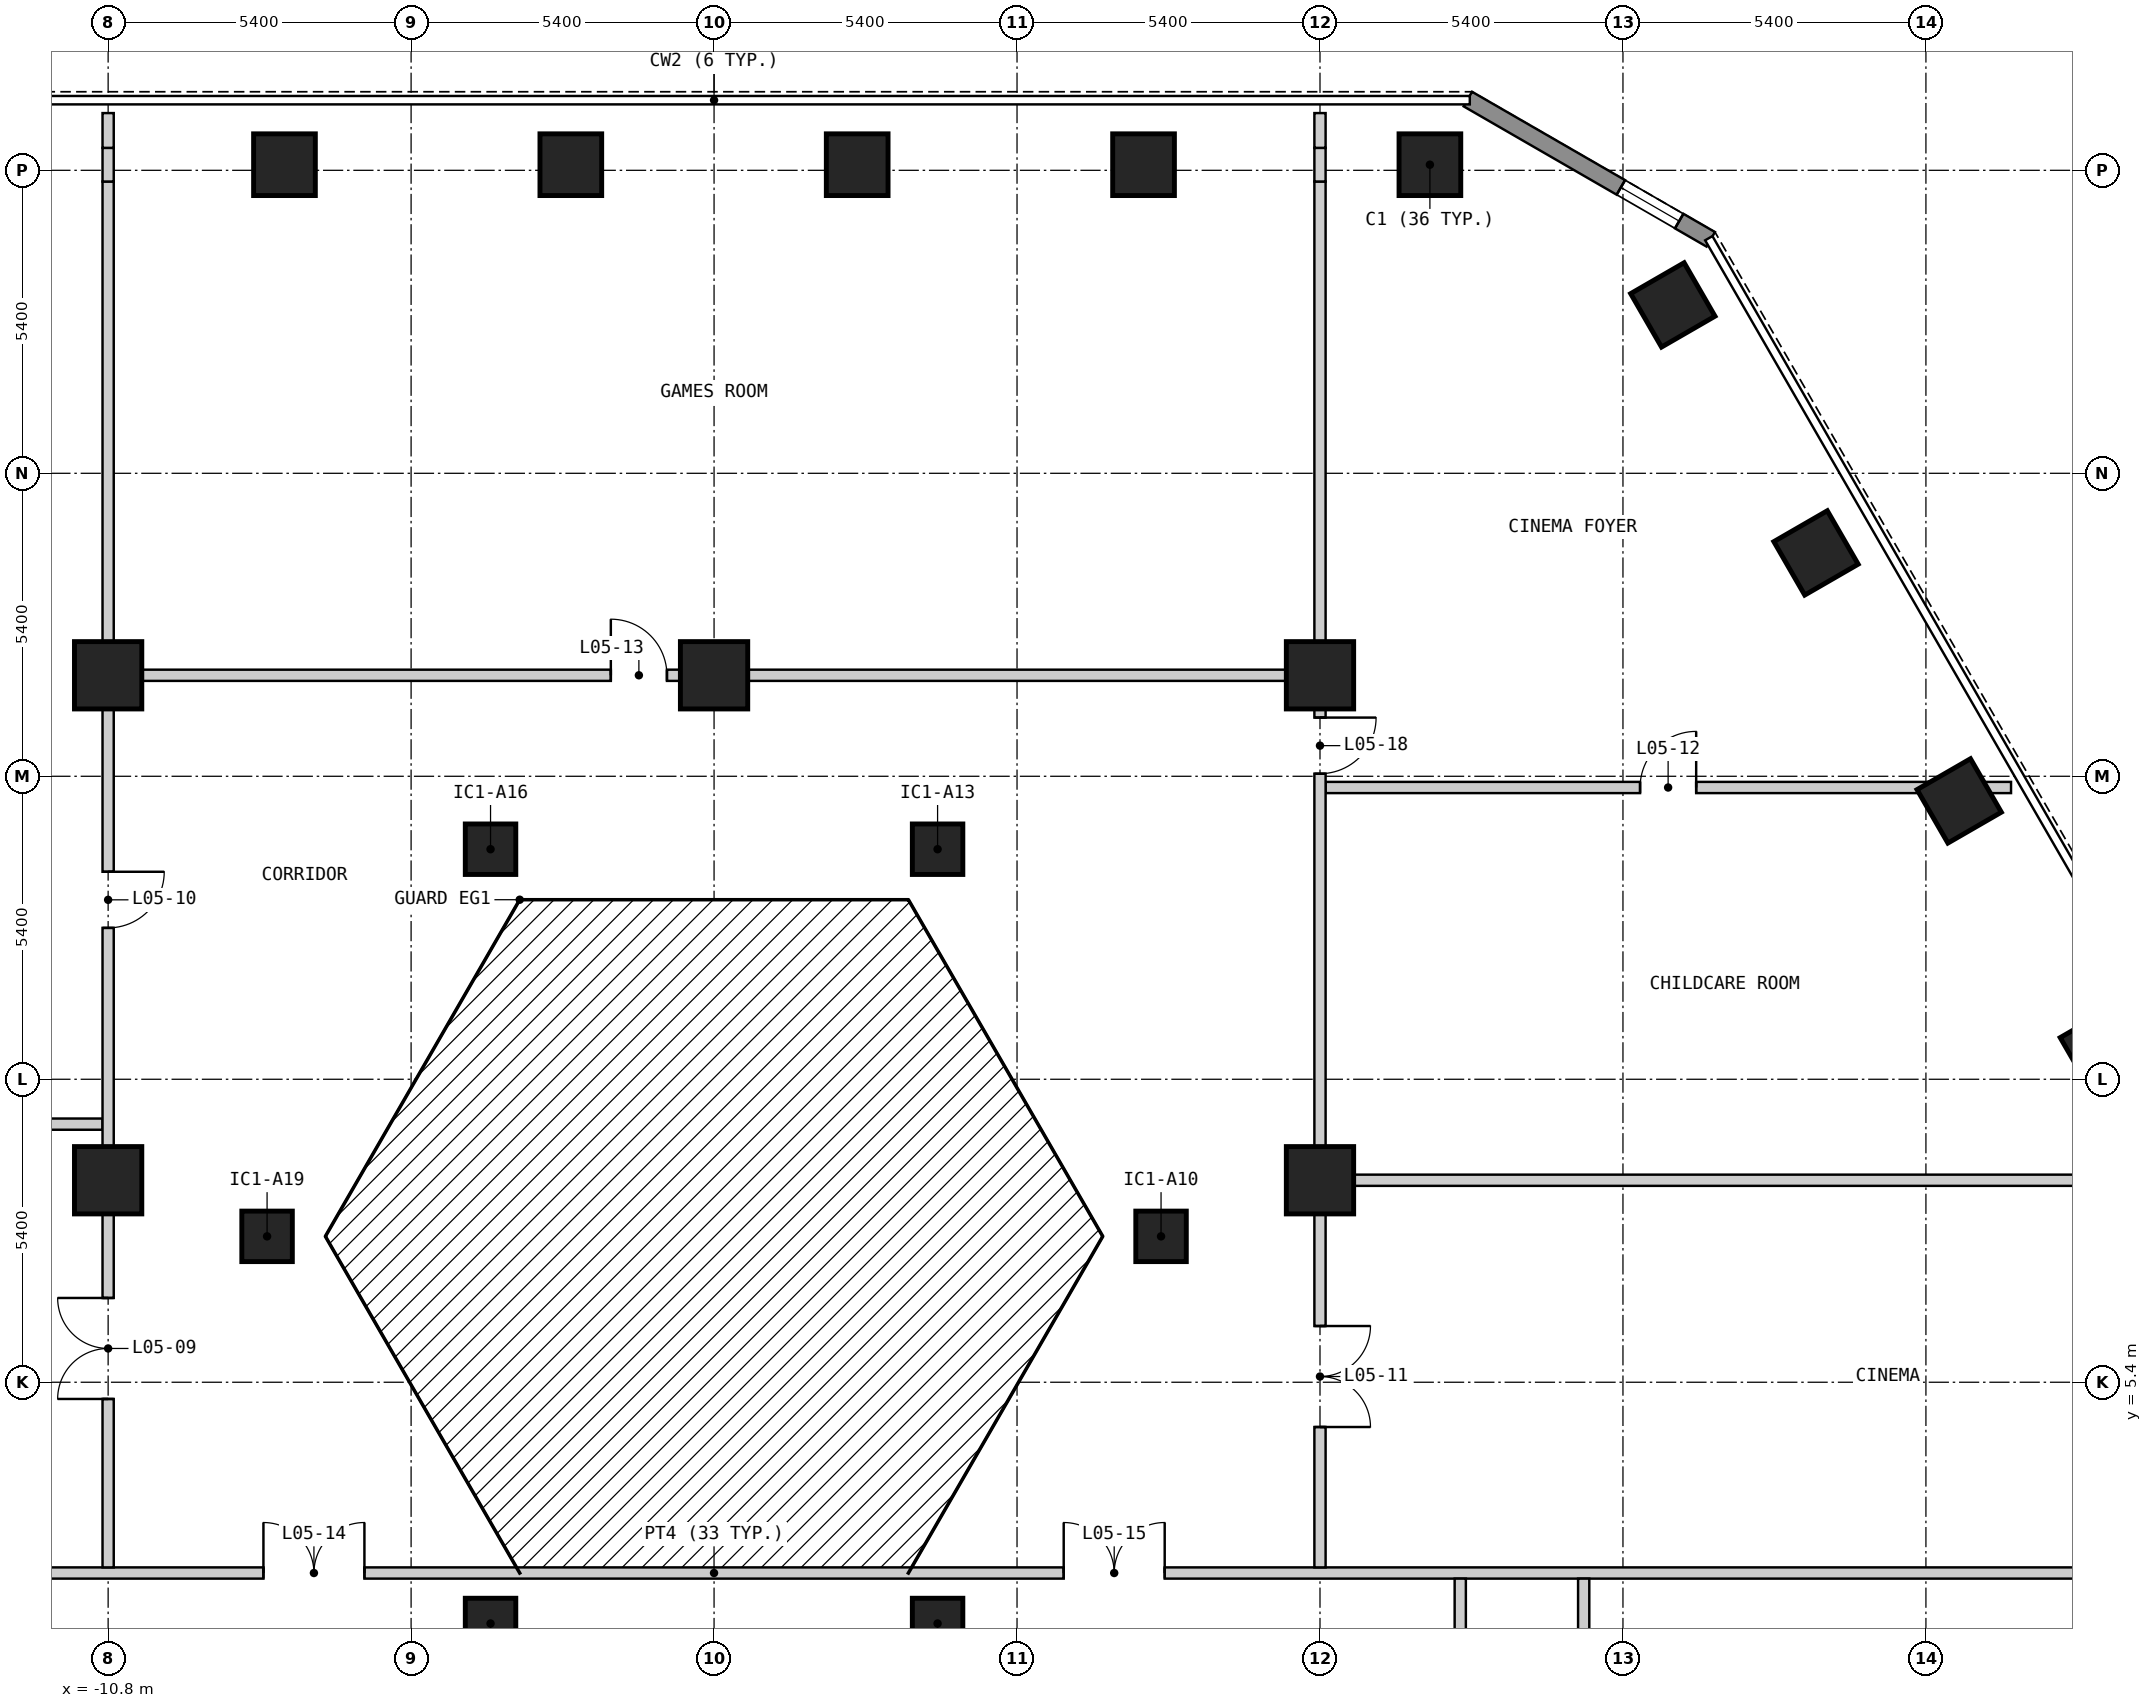
"""IFC4 building model, lengths in metres.
Left out: names, types, materials, properties, quantities, classifications, styles, units other than length and angle.
Written with IfcOpenShell. Run it as: python <this file> out.ifc"""

import sys

from ifc_helpers import new_model, si_unit, direction, frame, frame_2d, origin, origin_2d, place, context, subcontext, project, spatial, polyline, rectangle, outline, extrude, element, fill, save


model = new_model("IFC4")
c1 = context("Model", 3, precision=1e-05, world=origin(), true_north=direction((0.0, 1.0)))
c2 = subcontext(c1, "Body", "Model", "MODEL_VIEW")
j1 = project(units=[si_unit("LENGTHUNIT", "METRE"), si_unit("PLANEANGLEUNIT", "RADIAN")], contexts=[c1])
p1 = place(None, origin())
s1 = spatial("IfcSite", under=j1, at=p1, CompositionType="ELEMENT")
p2 = place(p1, origin())
s2 = spatial("IfcBuilding", under=s1, at=p2, CompositionType="ELEMENT")
p3 = place(p2, frame((0.0, 0.0, 19.8)))
s3 = spatial("IfcBuildingStorey", under=s2, at=p3, CompositionType="ELEMENT", Elevation=19.8)
for number, where, z_axis, x_axis in (
    (1, (12.759, 27.1, 0.0), (0.0, 0.0, 1.0), (-1.0, 0.0, 0.0)),
    (2, (7.655, 27.1, 0.0), (0.0, 0.0, 1.0), (-1.0, 0.0, 0.0)),
    (3, (2.551, 27.1, 0.0), (0.0, 0.0, 1.0), (-1.0, 0.0, 0.0)),
    (4, (-2.553, 27.1, 0.0), (0.0, 0.0, 1.0), (-1.0, 0.0, 0.0)),
    (5, (-7.657, 27.1, 0.0), (0.0, 0.0, 1.0), (-1.0, 0.0, 0.0)),
    (6, (24.745, 11.341, 0.0), (0.0, 0.0, 1.0), (-0.5, 0.866, 0.0)),
    (7, (22.193, 15.761, 0.0), (0.0, 0.0, 1.0), (-0.5, 0.866, 0.0)),
    (8, (19.641, 20.181, 0.0), (0.0, 0.0, 1.0), (-0.5, 0.866, 0.0)),
    (9, (17.089, 24.601, 0.0), (0.0, 0.0, 1.0), (-0.5, 0.866, 0.0)),
):
    element("IfcColumn", number, at=place(p3, frame(where, z_axis=z_axis, x_axis=x_axis)), inside=s3, PredefinedType="COLUMN", context=c2, shape_type="SweptSolid", body=[
        extrude(rectangle(XDim=1.1, YDim=1.1, at=origin_2d()), origin(), (0.0, 0.0, 1.0), 3.6),
    ])
for number, where, z_axis, x_axis in (
    (10, (3.984, 1.1, 0.0), (0.0, 0.0, 1.0), (1.0, 0.0, 0.0)),
    (11, (7.967, 8.0, 0.0), (0.0, 0.0, 1.0), (1.0, 0.0, 0.0)),
    (12, (3.984, 14.9, 0.0), (0.0, 0.0, 1.0), (1.0, 0.0, 0.0)),
    (13, (-3.984, 14.9, 0.0), (0.0, 0.0, 1.0), (1.0, 0.0, 0.0)),
    (14, (-7.967, 8.0, 0.0), (0.0, 0.0, 1.0), (1.0, 0.0, 0.0)),
    (15, (-3.984, 1.1, 0.0), (0.0, 0.0, 1.0), (1.0, 0.0, 0.0)),
):
    element("IfcColumn", number, at=place(p3, frame(where, z_axis=z_axis, x_axis=x_axis)), inside=s3, PredefinedType="COLUMN", context=c2, shape_type="SweptSolid", body=[
        extrude(rectangle(XDim=0.9, YDim=0.9, at=origin_2d()), origin(), (0.0, 0.0, 1.0), 3.6),
    ])
for number, where, z_axis, x_axis in (
    (16, (-10.8, 9.0, 0.0), (0.0, 0.0, 1.0), (1.0, 0.0, 0.0)),
    (17, (-10.8, 18.0, 0.0), (0.0, 0.0, 1.0), (1.0, 0.0, 0.0)),
    (18, (0.0, 18.0, 0.0), (0.0, 0.0, 1.0), (1.0, 0.0, 0.0)),
    (19, (10.8, 9.0, 0.0), (0.0, 0.0, 1.0), (1.0, 0.0, 0.0)),
    (20, (10.8, 18.0, 0.0), (0.0, 0.0, 1.0), (1.0, 0.0, 0.0)),
):
    element("IfcColumn", number, at=place(p3, frame(where, z_axis=z_axis, x_axis=x_axis)), inside=s3, PredefinedType="COLUMN", context=c2, shape_type="SweptSolid", body=[
        extrude(rectangle(XDim=1.2, YDim=1.2, at=origin_2d()), origin(), (0.0, 0.0, 1.0), 3.6),
    ])
p4 = place(p3, frame((17.765, 25.77, 0.0), z_axis=(0.0, 0.0, 1.0), x_axis=(-0.866010750942, 0.50002537861, 0.0)))
e21 = element("IfcWall", 21, at=p4, inside=s3, PredefinedType="SOLIDWALL", context=c2, shape_type="SweptSolid", body=[
    extrude(outline(polyline([(0.0, -0.15), (5.0, -0.15), (4.919, 0.15), (0.08, 0.15), (0.0, -0.15)])), origin(), (0.0, 0.0, 1.0), 2.8),
])
p5 = place(p4, frame((0.65, 0.0, 0.15)))
e22 = element("IfcOpeningElement", 22, at=p5, cuts=e21, PredefinedType="OPENING", context=c2, shape_type="SweptSolid", body=[
    extrude(rectangle(XDim=1.2, YDim=2.1, at=frame_2d((0.6, 1.05))), frame((0.0, 0.16, 0.0), z_axis=(0.0, -1.0, 0.0), x_axis=(1.0, 0.0, 0.0)), (0.0, 0.0, 1.0), 0.32),
])
p6 = place(p3, frame((-29.549, 2.0, 0.0), z_axis=(0.0, 0.0, 1.0), x_axis=(1.0, 0.0, 0.0)))
e23 = element("IfcWall", 23, at=p6, inside=s3, PredefinedType="PARTITIONING", context=c2, shape_type="SweptSolid", body=[
    extrude(rectangle(XDim=59.097, YDim=0.2, at=frame_2d((29.549, 0.0))), origin(), (0.0, 0.0, 1.0), 2.8),
])
p7 = place(p6, frame((21.517, 0.0, 0.0)))
e24 = element("IfcOpeningElement", 24, at=p7, cuts=e23, PredefinedType="OPENING", context=c2, shape_type="SweptSolid", body=[
    extrude(rectangle(XDim=1.8, YDim=2.1, at=frame_2d((0.9, 1.05))), frame((0.0, 0.11, 0.0), z_axis=(0.0, -1.0, 0.0), x_axis=(1.0, 0.0, 0.0)), (0.0, 0.0, 1.0), 0.22),
])
p8 = place(p6, frame((35.781, 0.0, 0.0)))
e25 = element("IfcOpeningElement", 25, at=p8, cuts=e23, PredefinedType="OPENING", context=c2, shape_type="SweptSolid", body=[
    extrude(rectangle(XDim=1.8, YDim=2.1, at=frame_2d((0.9, 1.05))), frame((0.0, 0.11, 0.0), z_axis=(0.0, -1.0, 0.0), x_axis=(1.0, 0.0, 0.0)), (0.0, 0.0, 1.0), 0.22),
])
p9 = place(p3, frame((10.9, 9.0, 0.0), z_axis=(0.0, 0.0, 1.0), x_axis=(1.0, 0.0, 0.0)))
e26 = element("IfcWall", 26, at=p9, inside=s3, PredefinedType="PARTITIONING", context=c2, shape_type="SweptSolid", body=[
    extrude(rectangle(XDim=14.792, YDim=0.2, at=frame_2d((7.396, 0.0))), origin(), (0.0, 0.0, 1.0), 2.8),
])
p10 = place(p3, frame((-25.115, 10.0, 0.0), z_axis=(0.0, 0.0, 1.0), x_axis=(1.0, 0.0, 0.0)))
e27 = element("IfcWall", 27, at=p10, inside=s3, PredefinedType="PARTITIONING", context=c2, shape_type="SweptSolid", body=[
    extrude(rectangle(XDim=14.215, YDim=0.2, at=frame_2d((7.107, 0.0))), origin(), (0.0, 0.0, 1.0), 2.8),
])
p11 = place(p3, frame((10.9, 16.0, 0.0), z_axis=(0.0, 0.0, 1.0), x_axis=(1.0, 0.0, 0.0)))
e28 = element("IfcWall", 28, at=p11, inside=s3, PredefinedType="PARTITIONING", context=c2, shape_type="SweptSolid", body=[
    extrude(rectangle(XDim=10.751, YDim=0.2, at=frame_2d((5.375, 0.0))), origin(), (0.0, 0.0, 1.0), 2.8),
])
p12 = place(p11, frame((6.605, 0.0, 0.0), z_axis=(0.0, 0.0, 1.0), x_axis=(-1.0, 0.0, 0.0)))
e29 = element("IfcOpeningElement", 29, at=p12, cuts=e28, PredefinedType="OPENING", context=c2, shape_type="SweptSolid", body=[
    extrude(rectangle(XDim=1.0, YDim=2.1, at=frame_2d((0.5, 1.05))), frame((0.0, 0.11, 0.0), z_axis=(0.0, -1.0, 0.0), x_axis=(1.0, 0.0, 0.0)), (0.0, 0.0, 1.0), 0.22),
])
p13 = place(p3, frame((21.651, 16.0, 0.0), z_axis=(0.0, 0.0, 1.0), x_axis=(1.0, 0.0, 0.0)))
e30 = element("IfcWall", 30, at=p13, inside=s3, PredefinedType="PARTITIONING", context=c2, shape_type="SweptSolid", body=[
    extrude(rectangle(XDim=0.802, YDim=0.2, at=frame_2d((0.401, 0.0))), origin(), (0.0, 0.0, 1.0), 2.07),
])
p14 = place(p3, frame((22.453, 16.0, 0.0), z_axis=(0.0, 0.0, 1.0), x_axis=(1.0, 0.0, 0.0)))
e31 = element("IfcWall", 31, at=p14, inside=s3, PredefinedType="PARTITIONING", context=c2, shape_type="SweptSolid", body=[
    extrude(rectangle(XDim=0.664, YDim=0.2, at=frame_2d((0.332, 0.0))), origin(), (0.0, 0.0, 1.0), 2.8),
])
p15 = place(p3, frame((-10.7, 18.0, 0.0), z_axis=(0.0, 0.0, 1.0), x_axis=(1.0, 0.0, 0.0)))
e32 = element("IfcWall", 32, at=p15, inside=s3, PredefinedType="PARTITIONING", context=c2, shape_type="SweptSolid", body=[
    extrude(rectangle(XDim=21.4, YDim=0.2, at=frame_2d((10.7, 0.0))), origin(), (0.0, 0.0, 1.0), 2.8),
])
p16 = place(p15, frame((8.86, 0.0, 0.0)))
e33 = element("IfcOpeningElement", 33, at=p16, cuts=e32, PredefinedType="OPENING", context=c2, shape_type="SweptSolid", body=[
    extrude(rectangle(XDim=1.0, YDim=2.1, at=frame_2d((0.5, 1.05))), frame((0.0, 0.11, 0.0), z_axis=(0.0, -1.0, 0.0), x_axis=(1.0, 0.0, 0.0)), (0.0, 0.0, 1.0), 0.22),
])
p17 = place(p3, frame((-10.8, 2.1, 0.0), z_axis=(0.0, 0.0, 1.0), x_axis=(0.0, 1.0, 0.0)))
e34 = element("IfcWall", 34, at=p17, inside=s3, PredefinedType="PARTITIONING", context=c2, shape_type="SweptSolid", body=[
    extrude(rectangle(XDim=24.7, YDim=0.2, at=frame_2d((12.35, 0.0))), origin(), (0.0, 0.0, 1.0), 2.8),
])
p18 = place(p17, frame((3.002, 0.0, 0.0)))
e35 = element("IfcOpeningElement", 35, at=p18, cuts=e34, PredefinedType="OPENING", context=c2, shape_type="SweptSolid", body=[
    extrude(rectangle(XDim=1.8, YDim=2.1, at=frame_2d((0.9, 1.05))), frame((0.0, 0.11, 0.0), z_axis=(0.0, -1.0, 0.0), x_axis=(1.0, 0.0, 0.0)), (0.0, 0.0, 1.0), 0.22),
])
p19 = place(p17, frame((11.398, 0.0, 0.0)))
e36 = element("IfcOpeningElement", 36, at=p19, cuts=e34, PredefinedType="OPENING", context=c2, shape_type="SweptSolid", body=[
    extrude(rectangle(XDim=1.0, YDim=2.1, at=frame_2d((0.5, 1.05))), frame((0.0, 0.11, 0.0), z_axis=(0.0, -1.0, 0.0), x_axis=(1.0, 0.0, 0.0)), (0.0, 0.0, 1.0), 0.22),
])
p20 = place(p3, frame((-10.8, 26.8, 0.0), z_axis=(0.0, 0.0, 1.0), x_axis=(0.0, 1.0, 0.0)))
e37 = element("IfcWall", 37, at=p20, inside=s3, PredefinedType="PARTITIONING", context=c2, shape_type="SweptSolid", body=[
    extrude(rectangle(XDim=0.6, YDim=0.2, at=frame_2d((0.3, 0.0))), origin(), (0.0, 0.0, 1.0), 2.07),
])
p21 = place(p3, frame((-10.8, 27.4, 0.0), z_axis=(0.0, 0.0, 1.0), x_axis=(0.0, 1.0, 0.0)))
e38 = element("IfcWall", 38, at=p21, inside=s3, PredefinedType="PARTITIONING", context=c2, shape_type="SweptSolid", body=[
    extrude(rectangle(XDim=0.62, YDim=0.2, at=frame_2d((0.31, 0.0))), origin(), (0.0, 0.0, 1.0), 2.8),
])
p22 = place(p3, frame((10.8, 2.1, 0.0), z_axis=(0.0, 0.0, 1.0), x_axis=(0.0, 1.0, 0.0)))
e39 = element("IfcWall", 39, at=p22, inside=s3, PredefinedType="PARTITIONING", context=c2, shape_type="SweptSolid", body=[
    extrude(rectangle(XDim=24.7, YDim=0.2, at=frame_2d((12.35, 0.0))), origin(), (0.0, 0.0, 1.0), 2.8),
])
p23 = place(p22, frame((4.302, 0.0, 0.0), z_axis=(0.0, 0.0, 1.0), x_axis=(-1.0, 0.0, 0.0)))
e40 = element("IfcOpeningElement", 40, at=p23, cuts=e39, PredefinedType="OPENING", context=c2, shape_type="SweptSolid", body=[
    extrude(rectangle(XDim=1.8, YDim=2.1, at=frame_2d((0.9, 1.05))), frame((0.0, 0.11, 0.0), z_axis=(0.0, -1.0, 0.0), x_axis=(1.0, 0.0, 0.0)), (0.0, 0.0, 1.0), 0.22),
])
p24 = place(p22, frame((14.146, 0.0, 0.0)))
e41 = element("IfcOpeningElement", 41, at=p24, cuts=e39, PredefinedType="OPENING", context=c2, shape_type="SweptSolid", body=[
    extrude(rectangle(XDim=1.0, YDim=2.1, at=frame_2d((0.5, 1.05))), frame((0.0, 0.11, 0.0), z_axis=(0.0, -1.0, 0.0), x_axis=(1.0, 0.0, 0.0)), (0.0, 0.0, 1.0), 0.22),
])
p25 = place(p3, frame((10.8, 26.8, 0.0), z_axis=(0.0, 0.0, 1.0), x_axis=(0.0, 1.0, 0.0)))
e42 = element("IfcWall", 42, at=p25, inside=s3, PredefinedType="PARTITIONING", context=c2, shape_type="SweptSolid", body=[
    extrude(rectangle(XDim=0.6, YDim=0.2, at=frame_2d((0.3, 0.0))), origin(), (0.0, 0.0, 1.0), 2.07),
])
p26 = place(p3, frame((10.8, 27.4, 0.0), z_axis=(0.0, 0.0, 1.0), x_axis=(0.0, 1.0, 0.0)))
e43 = element("IfcWall", 43, at=p26, inside=s3, PredefinedType="PARTITIONING", context=c2, shape_type="SweptSolid", body=[
    extrude(rectangle(XDim=0.62, YDim=0.2, at=frame_2d((0.31, 0.0))), origin(), (0.0, 0.0, 1.0), 2.8),
])
p27 = place(p3, frame((13.3, -4.88, 0.0), z_axis=(0.0, 0.0, 1.0), x_axis=(0.0, 1.0, 0.0)))
e44 = element("IfcWall", 44, at=p27, inside=s3, PredefinedType="PARTITIONING", context=c2, shape_type="SweptSolid", body=[
    extrude(rectangle(XDim=6.78, YDim=0.2, at=frame_2d((3.39, 0.0))), origin(), (0.0, 0.0, 1.0), 2.8),
])
p28 = place(p3, frame((15.5, -25.114, 0.0), z_axis=(0.0, 0.0, 1.0), x_axis=(0.0, 1.0, 0.0)))
e45 = element("IfcWall", 45, at=p28, inside=s3, PredefinedType="PARTITIONING", context=c2, shape_type="SweptSolid", body=[
    extrude(rectangle(XDim=27.014, YDim=0.2, at=frame_2d((13.507, 0.0))), origin(), (0.0, 0.0, 1.0), 2.8),
])
p29 = place(p28, frame((10.516, 0.0, 0.0), z_axis=(0.0, 0.0, 1.0), x_axis=(-1.0, 0.0, 0.0)))
e46 = element("IfcOpeningElement", 46, at=p29, cuts=e45, PredefinedType="OPENING", context=c2, shape_type="SweptSolid", body=[
    extrude(rectangle(XDim=1.0, YDim=2.1, at=frame_2d((0.5, 1.05))), frame((0.0, 0.11, 0.0), z_axis=(0.0, -1.0, 0.0), x_axis=(1.0, 0.0, 0.0)), (0.0, 0.0, 1.0), 0.22),
])
p30 = place(p28, frame((22.112, 0.0, 0.0), z_axis=(0.0, 0.0, 1.0), x_axis=(-1.0, 0.0, 0.0)))
e47 = element("IfcOpeningElement", 47, at=p30, cuts=e45, PredefinedType="OPENING", context=c2, shape_type="SweptSolid", body=[
    extrude(rectangle(XDim=1.0, YDim=2.1, at=frame_2d((0.5, 1.05))), frame((0.0, 0.11, 0.0), z_axis=(0.0, -1.0, 0.0), x_axis=(1.0, 0.0, 0.0)), (0.0, 0.0, 1.0), 0.22),
])
p31 = place(p5, origin())
e48 = element("IfcWindow", 48, at=p31, inside=s3, PartitioningType="SINGLE_PANEL", PredefinedType="WINDOW", context=c2, shape_type="SweptSolid", body=[
    extrude(rectangle(XDim=1.2, YDim=2.1, at=frame_2d((0.6, 1.05))), frame((0.0, 0.03, 0.0), z_axis=(0.0, -1.0, 0.0), x_axis=(1.0, 0.0, 0.0)), (0.0, 0.0, 1.0), 0.06),
])
fill(e22, e48)
p32 = place(p18, origin())
e49 = element("IfcDoor", 49, at=p32, inside=s3, OperationType="DOUBLE_DOOR_SINGLE_SWING", PredefinedType="DOOR", context=c2, shape_type="SweptSolid", body=[
    extrude(rectangle(XDim=1.8, YDim=2.1, at=frame_2d((0.9, 1.05))), frame((0.0, 0.025, 0.0), z_axis=(0.0, -1.0, 0.0), x_axis=(1.0, 0.0, 0.0)), (0.0, 0.0, 1.0), 0.05),
])
fill(e35, e49)
p33 = place(p19, origin())
e50 = element("IfcDoor", 50, at=p33, inside=s3, OperationType="SINGLE_SWING_RIGHT", PredefinedType="DOOR", context=c2, shape_type="SweptSolid", body=[
    extrude(rectangle(XDim=1.0, YDim=2.1, at=frame_2d((0.5, 1.05))), frame((0.0, 0.025, 0.0), z_axis=(0.0, -1.0, 0.0), x_axis=(1.0, 0.0, 0.0)), (0.0, 0.0, 1.0), 0.05),
])
fill(e36, e50)
p34 = place(p23, origin())
e51 = element("IfcDoor", 51, at=p34, inside=s3, OperationType="DOUBLE_DOOR_SINGLE_SWING", PredefinedType="DOOR", context=c2, shape_type="SweptSolid", body=[
    extrude(rectangle(XDim=1.8, YDim=2.1, at=frame_2d((0.9, 1.05))), frame((0.0, 0.025, 0.0), z_axis=(0.0, -1.0, 0.0), x_axis=(1.0, 0.0, 0.0)), (0.0, 0.0, 1.0), 0.05),
])
fill(e40, e51)
p35 = place(p12, origin())
e52 = element("IfcDoor", 52, at=p35, inside=s3, OperationType="SINGLE_SWING_LEFT", PredefinedType="DOOR", context=c2, shape_type="SweptSolid", body=[
    extrude(rectangle(XDim=1.0, YDim=2.1, at=frame_2d((0.5, 1.05))), frame((0.0, 0.025, 0.0), z_axis=(0.0, -1.0, 0.0), x_axis=(1.0, 0.0, 0.0)), (0.0, 0.0, 1.0), 0.05),
])
fill(e29, e52)
p36 = place(p16, origin())
e53 = element("IfcDoor", 53, at=p36, inside=s3, OperationType="SINGLE_SWING_LEFT", PredefinedType="DOOR", context=c2, shape_type="SweptSolid", body=[
    extrude(rectangle(XDim=1.0, YDim=2.1, at=frame_2d((0.5, 1.05))), frame((0.0, 0.025, 0.0), z_axis=(0.0, -1.0, 0.0), x_axis=(1.0, 0.0, 0.0)), (0.0, 0.0, 1.0), 0.05),
])
fill(e33, e53)
p37 = place(p7, origin())
e54 = element("IfcDoor", 54, at=p37, inside=s3, OperationType="DOUBLE_DOOR_SINGLE_SWING", PredefinedType="DOOR", context=c2, shape_type="SweptSolid", body=[
    extrude(rectangle(XDim=1.8, YDim=2.1, at=frame_2d((0.9, 1.05))), frame((0.0, 0.025, 0.0), z_axis=(0.0, -1.0, 0.0), x_axis=(1.0, 0.0, 0.0)), (0.0, 0.0, 1.0), 0.05),
])
fill(e24, e54)
p38 = place(p8, origin())
e55 = element("IfcDoor", 55, at=p38, inside=s3, OperationType="DOUBLE_DOOR_SINGLE_SWING", PredefinedType="DOOR", context=c2, shape_type="SweptSolid", body=[
    extrude(rectangle(XDim=1.8, YDim=2.1, at=frame_2d((0.9, 1.05))), frame((0.0, 0.025, 0.0), z_axis=(0.0, -1.0, 0.0), x_axis=(1.0, 0.0, 0.0)), (0.0, 0.0, 1.0), 0.05),
])
fill(e25, e55)
p39 = place(p24, origin())
e56 = element("IfcDoor", 56, at=p39, inside=s3, OperationType="SINGLE_SWING_RIGHT", PredefinedType="DOOR", context=c2, shape_type="SweptSolid", body=[
    extrude(rectangle(XDim=1.0, YDim=2.1, at=frame_2d((0.5, 1.05))), frame((0.0, 0.025, 0.0), z_axis=(0.0, -1.0, 0.0), x_axis=(1.0, 0.0, 0.0)), (0.0, 0.0, 1.0), 0.05),
])
fill(e41, e56)
save(model, sys.argv[1])
